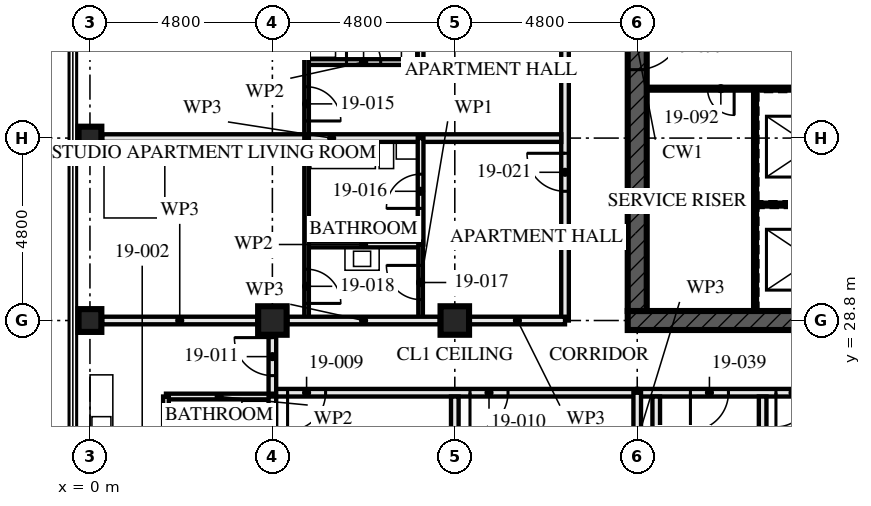
"""IFC4 building model, lengths in metres.
Left out: names, types, materials, properties, quantities, classifications, styles, units other than length and angle.
Written with IfcOpenShell. Run it as: python <this file> out.ifc"""

import sys

from ifc_helpers import new_model, si_unit, direction, frame, frame_2d, origin, origin_2d, place, context, subcontext, project, spatial, rectangle, hollow_rectangle, extrude, element, fill, save


model = new_model("IFC4")
c1 = context("Model", 3, precision=1e-05, world=origin(), true_north=direction((0.0, 1.0)))
c2 = subcontext(c1, "Body", "Model", "MODEL_VIEW")
j1 = project(units=[si_unit("LENGTHUNIT", "METRE"), si_unit("PLANEANGLEUNIT", "RADIAN")], contexts=[c1])
p1 = place(None, origin())
s1 = spatial("IfcSite", under=j1, at=p1, CompositionType="ELEMENT")
p2 = place(p1, origin())
s2 = spatial("IfcBuilding", under=s1, at=p2, CompositionType="ELEMENT")
p3 = place(p2, frame((0.0, 0.0, 72.5)))
s3 = spatial("IfcBuildingStorey", under=s2, at=p3, CompositionType="ELEMENT", Elevation=72.5)
for number, where, z_axis, x_axis in (
    (1, (0.0, 28.8, 0.0), (0.0, 0.0, 1.0), (0.0, 1.0, 0.0)),
    (2, (0.0, 33.6, 0.0), (0.0, 0.0, 1.0), (1.0, 0.0, 0.0)),
):
    element("IfcColumn", number, at=place(p3, frame(where, z_axis=z_axis, x_axis=x_axis)), inside=s3, PredefinedType="COLUMN", context=c2, shape_type="SweptSolid", body=[
        extrude(hollow_rectangle(XDim=0.6, YDim=0.6, WallThickness=0.08, at=origin_2d()), origin(), (0.0, 0.0, 1.0), 3.5),
    ])
for number, where, z_axis, x_axis in (
    (3, (4.8, 28.8, 0.0), (0.0, 0.0, 1.0), (0.0, 1.0, 0.0)),
    (4, (9.6, 28.8, 0.0), (0.0, 0.0, 1.0), (0.0, 1.0, 0.0)),
):
    element("IfcColumn", number, at=place(p3, frame(where, z_axis=z_axis, x_axis=x_axis)), inside=s3, PredefinedType="COLUMN", context=c2, shape_type="SweptSolid", body=[
        extrude(hollow_rectangle(XDim=0.75, YDim=0.75, WallThickness=0.08, at=origin_2d()), origin(), (0.0, 0.0, 1.0), 3.5),
    ])
p4 = place(p3, frame((14.15, 28.8, -0.17), z_axis=(0.0, 0.0, 1.0), x_axis=(1.0, 0.0, 0.0)))
e5 = element("IfcWall", 5, at=p4, inside=s3, PredefinedType="SHEAR", context=c2, shape_type="SweptSolid", body=[
    extrude(rectangle(XDim=14.9, YDim=0.5, at=frame_2d((7.45, 0.0))), origin(), (0.0, 0.0, 1.0), 3.5),
])
p5 = place(p4, frame((6.85, 0.0, 0.17)))
e6 = element("IfcOpeningElement", 6, at=p5, cuts=e5, PredefinedType="OPENING", context=c2, shape_type="SweptSolid", body=[
    extrude(rectangle(XDim=1.2, YDim=2.1, at=frame_2d((0.6, 1.05))), frame((0.0, 0.26, 0.0), z_axis=(0.0, -1.0, 0.0), x_axis=(1.0, 0.0, 0.0)), (0.0, 0.0, 1.0), 0.521),
])
p6 = place(p3, frame((14.4, 42.95, -0.17), z_axis=(0.0, 0.0, 1.0), x_axis=(0.0, -1.0, 0.0)))
e7 = element("IfcWall", 7, at=p6, inside=s3, PredefinedType="SHEAR", context=c2, shape_type="SweptSolid", body=[
    extrude(rectangle(XDim=13.9, YDim=0.5, at=frame_2d((6.95, 0.0))), origin(), (0.0, 0.0, 1.0), 3.5),
])
p7 = place(p6, frame((6.35, 0.0, 0.17)))
e8 = element("IfcOpeningElement", 8, at=p7, cuts=e7, PredefinedType="OPENING", context=c2, shape_type="SweptSolid", body=[
    extrude(rectangle(XDim=1.2, YDim=2.1, at=frame_2d((0.6, 1.05))), frame((0.0, 0.26, 0.0), z_axis=(0.0, -1.0, 0.0), x_axis=(1.0, 0.0, 0.0)), (0.0, 0.0, 1.0), 0.521),
])
p8 = place(p3, frame((2.0, 23.8, 0.0), z_axis=(0.0, 0.0, 1.0), x_axis=(0.0, 1.0, 0.0)))
e9 = element("IfcWall", 9, at=p8, inside=s3, PredefinedType="PARTITIONING", context=c2, shape_type="SweptSolid", body=[
    extrude(rectangle(XDim=3.0, YDim=0.15, at=frame_2d((1.5, 0.0))), origin(), (0.0, 0.0, 1.0), 2.55),
])
p9 = place(p8, frame((1.05, 0.0, 0.0)))
e10 = element("IfcOpeningElement", 10, at=p9, cuts=e9, PredefinedType="OPENING", context=c2, shape_type="SweptSolid", body=[
    extrude(rectangle(XDim=0.9, YDim=2.1, at=frame_2d((0.45, 1.05))), frame((0.0, 0.085, 0.0), z_axis=(0.0, -1.0, 0.0), x_axis=(1.0, 0.0, 0.0)), (0.0, 0.0, 1.0), 0.171),
])
p10 = place(p3, frame((2.0, 26.8, 0.0), z_axis=(0.0, 0.0, 1.0), x_axis=(1.0, 0.0, 0.0)))
e11 = element("IfcWall", 11, at=p10, inside=s3, PredefinedType="PARTITIONING", context=c2, shape_type="SweptSolid", body=[
    extrude(rectangle(XDim=2.8, YDim=0.15, at=frame_2d((1.4, 0.0))), origin(), (0.0, 0.0, 1.0), 3.33),
])
p11 = place(p3, frame((4.8, 19.52, 0.0), z_axis=(0.0, 0.0, 1.0), x_axis=(0.0, 1.0, 0.0)))
e12 = element("IfcWall", 12, at=p11, inside=s3, PredefinedType="PARTITIONING", context=c2, shape_type="SweptSolid", body=[
    extrude(rectangle(XDim=7.28, YDim=0.2, at=frame_2d((3.64, 0.0))), origin(), (0.0, 0.0, 1.0), 2.55),
])
p12 = place(p3, frame((9.6, 14.72, 0.0), z_axis=(0.0, 0.0, 1.0), x_axis=(0.0, 1.0, 0.0)))
e13 = element("IfcWall", 13, at=p12, inside=s3, PredefinedType="PARTITIONING", context=c2, shape_type="SweptSolid", body=[
    extrude(rectangle(XDim=12.08, YDim=0.2, at=frame_2d((6.04, 0.0))), origin(), (0.0, 0.0, 1.0), 2.55),
])
p13 = place(p3, frame((4.8, 26.9, 0.0), z_axis=(0.0, 0.0, 1.0), x_axis=(1.0, 0.0, 0.0)))
e14 = element("IfcWall", 14, at=p13, inside=s3, PredefinedType="PARTITIONING", context=c2, shape_type="SweptSolid", body=[
    extrude(rectangle(XDim=9.6, YDim=0.2, at=frame_2d((4.8, 0.0))), origin(), (0.0, 0.0, 1.0), 3.33),
])
p14 = place(p13, frame((0.4, 0.0, 0.0)))
e15 = element("IfcOpeningElement", 15, at=p14, cuts=e14, PredefinedType="OPENING", context=c2, shape_type="SweptSolid", body=[
    extrude(rectangle(XDim=1.0, YDim=2.1, at=frame_2d((0.5, 1.05))), frame((0.0, 0.111, 0.0), z_axis=(0.0, -1.0, 0.0), x_axis=(1.0, 0.0, 0.0)), (0.0, 0.0, 1.0), 0.221),
])
p15 = place(p13, frame((5.2, 0.0, 0.0)))
e16 = element("IfcOpeningElement", 16, at=p15, cuts=e14, PredefinedType="OPENING", context=c2, shape_type="SweptSolid", body=[
    extrude(rectangle(XDim=1.0, YDim=2.1, at=frame_2d((0.5, 1.05))), frame((0.0, 0.111, 0.0), z_axis=(0.0, -1.0, 0.0), x_axis=(1.0, 0.0, 0.0)), (0.0, 0.0, 1.0), 0.221),
])
p16 = place(p3, frame((4.8, 26.8, 0.0), z_axis=(0.0, 0.0, 1.0), x_axis=(0.0, 1.0, 0.0)))
e17 = element("IfcWall", 17, at=p16, inside=s3, PredefinedType="PARTITIONING", context=c2, shape_type="SweptSolid", body=[
    extrude(rectangle(XDim=1.605, YDim=0.2, at=frame_2d((0.802, 0.0))), origin(), (0.0, 0.0, 1.0), 3.33),
])
p17 = place(p16, frame((0.55, 0.0, 0.0)))
e18 = element("IfcOpeningElement", 18, at=p17, cuts=e17, PredefinedType="OPENING", context=c2, shape_type="SweptSolid", body=[
    extrude(rectangle(XDim=1.0, YDim=2.1, at=frame_2d((0.5, 1.05))), frame((0.0, 0.111, 0.0), z_axis=(0.0, -1.0, 0.0), x_axis=(1.0, 0.0, 0.0)), (0.0, 0.0, 1.0), 0.221),
])
p18 = place(p3, frame((5.7, 35.6, 0.0), z_axis=(0.0, 0.0, 1.0), x_axis=(1.0, 0.0, 0.0)))
e19 = element("IfcWall", 19, at=p18, inside=s3, PredefinedType="PARTITIONING", context=c2, shape_type="SweptSolid", body=[
    extrude(rectangle(XDim=3.0, YDim=0.15, at=frame_2d((1.5, 0.0))), origin(), (0.0, 0.0, 1.0), 3.33),
])
p19 = place(p18, frame((1.05, 0.0, 0.0)))
e20 = element("IfcOpeningElement", 20, at=p19, cuts=e19, PredefinedType="OPENING", context=c2, shape_type="SweptSolid", body=[
    extrude(rectangle(XDim=0.9, YDim=2.1, at=frame_2d((0.45, 1.05))), frame((0.0, 0.085, 0.0), z_axis=(0.0, -1.0, 0.0), x_axis=(1.0, 0.0, 0.0)), (0.0, 0.0, 1.0), 0.171),
])
p20 = place(p3, frame((8.7, 38.4, 0.0), z_axis=(0.0, 0.0, 1.0), x_axis=(0.0, -1.0, 0.0)))
e21 = element("IfcWall", 21, at=p20, inside=s3, PredefinedType="PARTITIONING", context=c2, shape_type="SweptSolid", body=[
    extrude(rectangle(XDim=2.8, YDim=0.15, at=frame_2d((1.4, 0.0))), origin(), (0.0, 0.0, 1.0), 3.33),
])
p21 = place(p3, frame((5.7, 38.4, 0.0), z_axis=(0.0, 0.0, 1.0), x_axis=(0.0, -1.0, 0.0)))
e22 = element("IfcWall", 22, at=p21, inside=s3, PredefinedType="PARTITIONING", context=c2, shape_type="SweptSolid", body=[
    extrude(rectangle(XDim=4.8, YDim=0.12, at=frame_2d((2.4, 0.0))), origin(), (0.0, 0.0, 1.0), 3.33),
])
p22 = place(p21, frame((3.45, 0.0, 0.0)))
e23 = element("IfcOpeningElement", 23, at=p22, cuts=e22, PredefinedType="OPENING", context=c2, shape_type="SweptSolid", body=[
    extrude(rectangle(XDim=0.9, YDim=2.1, at=frame_2d((0.45, 1.05))), frame((0.0, 0.071, 0.0), z_axis=(0.0, -1.0, 0.0), x_axis=(1.0, 0.0, 0.0)), (0.0, 0.0, 1.0), 0.141),
])
p23 = place(p3, frame((0.32, 33.6, 0.0), z_axis=(0.0, 0.0, 1.0), x_axis=(1.0, 0.0, 0.0)))
e24 = element("IfcWall", 24, at=p23, inside=s3, PredefinedType="PARTITIONING", context=c2, shape_type="SweptSolid", body=[
    extrude(rectangle(XDim=12.08, YDim=0.2, at=frame_2d((6.04, 0.0))), origin(), (0.0, 0.0, 1.0), 2.55),
])
p24 = place(p3, frame((5.7, 30.8, 0.0), z_axis=(0.0, 0.0, 1.0), x_axis=(1.0, 0.0, 0.0)))
e25 = element("IfcWall", 25, at=p24, inside=s3, PredefinedType="PARTITIONING", context=c2, shape_type="SweptSolid", body=[
    extrude(rectangle(XDim=3.0, YDim=0.15, at=frame_2d((1.5, 0.0))), origin(), (0.0, 0.0, 1.0), 3.33),
])
p25 = place(p3, frame((8.7, 33.6, 0.0), z_axis=(0.0, 0.0, 1.0), x_axis=(0.0, -1.0, 0.0)))
e26 = element("IfcWall", 26, at=p25, inside=s3, PredefinedType="PARTITIONING", context=c2, shape_type="SweptSolid", body=[
    extrude(rectangle(XDim=2.8, YDim=0.15, at=frame_2d((1.4, 0.0))), origin(), (0.0, 0.0, 1.0), 3.33),
])
p26 = place(p25, frame((0.95, 0.0, 0.0)))
e27 = element("IfcOpeningElement", 27, at=p26, cuts=e26, PredefinedType="OPENING", context=c2, shape_type="SweptSolid", body=[
    extrude(rectangle(XDim=0.9, YDim=2.1, at=frame_2d((0.45, 1.05))), frame((0.0, 0.085, 0.0), z_axis=(0.0, -1.0, 0.0), x_axis=(1.0, 0.0, 0.0)), (0.0, 0.0, 1.0), 0.171),
])
p27 = place(p3, frame((8.7, 30.8, 0.0), z_axis=(0.0, 0.0, 1.0), x_axis=(0.0, -1.0, 0.0)))
e28 = element("IfcWall", 28, at=p27, inside=s3, PredefinedType="PARTITIONING", context=c2, shape_type="SweptSolid", body=[
    extrude(rectangle(XDim=2.0, YDim=0.12, at=frame_2d((1.0, 0.0))), origin(), (0.0, 0.0, 1.0), 3.33),
])
p28 = place(p27, frame((0.55, 0.0, 0.0)))
e29 = element("IfcOpeningElement", 29, at=p28, cuts=e28, PredefinedType="OPENING", context=c2, shape_type="SweptSolid", body=[
    extrude(rectangle(XDim=0.9, YDim=2.1, at=frame_2d((0.45, 1.05))), frame((0.0, 0.071, 0.0), z_axis=(0.0, -1.0, 0.0), x_axis=(1.0, 0.0, 0.0)), (0.0, 0.0, 1.0), 0.141),
])
p29 = place(p3, frame((5.7, 33.6, 0.0), z_axis=(0.0, 0.0, 1.0), x_axis=(0.0, -1.0, 0.0)))
e30 = element("IfcWall", 30, at=p29, inside=s3, PredefinedType="PARTITIONING", context=c2, shape_type="SweptSolid", body=[
    extrude(rectangle(XDim=4.8, YDim=0.12, at=frame_2d((2.4, 0.0))), origin(), (0.0, 0.0, 1.0), 3.33),
])
p30 = place(p29, frame((3.45, 0.0, 0.0)))
e31 = element("IfcOpeningElement", 31, at=p30, cuts=e30, PredefinedType="OPENING", context=c2, shape_type="SweptSolid", body=[
    extrude(rectangle(XDim=0.9, YDim=2.1, at=frame_2d((0.45, 1.05))), frame((0.0, 0.071, 0.0), z_axis=(0.0, -1.0, 0.0), x_axis=(1.0, 0.0, 0.0)), (0.0, 0.0, 1.0), 0.141),
])
p31 = place(p3, frame((12.5, 43.2, 0.0), z_axis=(0.0, 0.0, 1.0), x_axis=(0.0, -1.0, 0.0)))
e32 = element("IfcWall", 32, at=p31, inside=s3, PredefinedType="PARTITIONING", context=c2, shape_type="SweptSolid", body=[
    extrude(rectangle(XDim=14.4, YDim=0.2, at=frame_2d((7.2, 0.0))), origin(), (0.0, 0.0, 1.0), 2.55),
])
p32 = place(p31, frame((1.4, 0.0, 0.0)))
e33 = element("IfcOpeningElement", 33, at=p32, cuts=e32, PredefinedType="OPENING", context=c2, shape_type="SweptSolid", body=[
    extrude(rectangle(XDim=1.0, YDim=2.1, at=frame_2d((0.5, 1.05))), frame((0.0, 0.111, 0.0), z_axis=(0.0, -1.0, 0.0), x_axis=(1.0, 0.0, 0.0)), (0.0, 0.0, 1.0), 0.221),
])
p33 = place(p31, frame((5.2, 0.0, 0.0)))
e34 = element("IfcOpeningElement", 34, at=p33, cuts=e32, PredefinedType="OPENING", context=c2, shape_type="SweptSolid", body=[
    extrude(rectangle(XDim=1.0, YDim=2.1, at=frame_2d((0.5, 1.05))), frame((0.0, 0.111, 0.0), z_axis=(0.0, -1.0, 0.0), x_axis=(1.0, 0.0, 0.0)), (0.0, 0.0, 1.0), 0.221),
])
p34 = place(p31, frame((10.0, 0.0, 0.0)))
e35 = element("IfcOpeningElement", 35, at=p34, cuts=e32, PredefinedType="OPENING", context=c2, shape_type="SweptSolid", body=[
    extrude(rectangle(XDim=1.0, YDim=2.1, at=frame_2d((0.5, 1.05))), frame((0.0, 0.111, 0.0), z_axis=(0.0, -1.0, 0.0), x_axis=(1.0, 0.0, 0.0)), (0.0, 0.0, 1.0), 0.221),
])
for number, where, z_axis, x_axis in (
    (36, (14.9, 22.1, 0.0), (0.0, 0.0, 1.0), (0.0, 1.0, 0.0)),
    (37, (17.7, 22.1, 0.0), (0.0, 0.0, 1.0), (0.0, 1.0, 0.0)),
):
    element("IfcWall", number, at=place(p3, frame(where, z_axis=z_axis, x_axis=x_axis)), inside=s3, PredefinedType="SOLIDWALL", context=c2, shape_type="SweptSolid", body=[
        extrude(rectangle(XDim=4.7, YDim=0.2, at=frame_2d((2.35, 0.0))), origin(), (0.0, 0.0, 1.0), 2.99),
    ])
p35 = place(p3, frame((14.4, 26.9, 0.0), z_axis=(0.0, 0.0, 1.0), x_axis=(1.0, 0.0, 0.0)))
e38 = element("IfcWall", 38, at=p35, inside=s3, PredefinedType="PARTITIONING", context=c2, shape_type="SweptSolid", body=[
    extrude(rectangle(XDim=14.4, YDim=0.2, at=frame_2d((7.2, 0.0))), origin(), (0.0, 0.0, 1.0), 2.55),
])
p36 = place(p35, frame((1.4, 0.0, 0.0)))
e39 = element("IfcOpeningElement", 39, at=p36, cuts=e38, PredefinedType="OPENING", context=c2, shape_type="SweptSolid", body=[
    extrude(rectangle(XDim=1.0, YDim=2.1, at=frame_2d((0.5, 1.05))), frame((0.0, 0.111, 0.0), z_axis=(0.0, -1.0, 0.0), x_axis=(1.0, 0.0, 0.0)), (0.0, 0.0, 1.0), 0.221),
])
p37 = place(p35, frame((3.65, 0.0, 0.0)))
e40 = element("IfcOpeningElement", 40, at=p37, cuts=e38, PredefinedType="OPENING", context=c2, shape_type="SweptSolid", body=[
    extrude(rectangle(XDim=0.9, YDim=2.1, at=frame_2d((0.45, 1.05))), frame((0.0, 0.111, 0.0), z_axis=(0.0, -1.0, 0.0), x_axis=(1.0, 0.0, 0.0)), (0.0, 0.0, 1.0), 0.221),
])
p38 = place(p35, frame((5.2, 0.0, 0.0)))
e41 = element("IfcOpeningElement", 41, at=p38, cuts=e38, PredefinedType="OPENING", context=c2, shape_type="SweptSolid", body=[
    extrude(rectangle(XDim=1.0, YDim=2.1, at=frame_2d((0.5, 1.05))), frame((0.0, 0.111, 0.0), z_axis=(0.0, -1.0, 0.0), x_axis=(1.0, 0.0, 0.0)), (0.0, 0.0, 1.0), 0.221),
])
p39 = place(p35, frame((10.0, 0.0, 0.0)))
e42 = element("IfcOpeningElement", 42, at=p39, cuts=e38, PredefinedType="OPENING", context=c2, shape_type="SweptSolid", body=[
    extrude(rectangle(XDim=1.0, YDim=2.1, at=frame_2d((0.5, 1.05))), frame((0.0, 0.111, 0.0), z_axis=(0.0, -1.0, 0.0), x_axis=(1.0, 0.0, 0.0)), (0.0, 0.0, 1.0), 0.221),
])
p40 = place(p3, frame((14.65, 34.9, 0.0), z_axis=(0.0, 0.0, 1.0), x_axis=(1.0, 0.0, 0.0)))
e43 = element("IfcWall", 43, at=p40, inside=s3, PredefinedType="SOLIDWALL", context=c2, shape_type="SweptSolid", body=[
    extrude(rectangle(XDim=5.9, YDim=0.1, at=frame_2d((2.95, 0.0))), origin(), (0.0, 0.0, 1.0), 3.33),
])
p41 = place(p40, frame((1.6, 0.0, 0.0)))
e44 = element("IfcOpeningElement", 44, at=p41, cuts=e43, PredefinedType="OPENING", context=c2, shape_type="SweptSolid", body=[
    extrude(rectangle(XDim=0.7, YDim=2.1, at=frame_2d((0.35, 1.05))), frame((0.0, 0.061, 0.0), z_axis=(0.0, -1.0, 0.0), x_axis=(1.0, 0.0, 0.0)), (0.0, 0.0, 1.0), 0.121),
])
p42 = place(p3, frame((17.5, 29.05, 0.0), z_axis=(0.0, 0.0, 1.0), x_axis=(0.0, 1.0, 0.0)))
e45 = element("IfcWall", 45, at=p42, inside=s3, PredefinedType="SOLIDWALL", context=c2, shape_type="SweptSolid", body=[
    extrude(rectangle(XDim=5.8, YDim=0.1, at=frame_2d((2.9, 0.0))), origin(), (0.0, 0.0, 1.0), 3.33),
])
p43 = place(p3, frame((17.55, 31.85, 0.0), z_axis=(0.0, 0.0, 1.0), x_axis=(1.0, 0.0, 0.0)))
e46 = element("IfcWall", 46, at=p43, inside=s3, PredefinedType="SOLIDWALL", context=c2, shape_type="SweptSolid", body=[
    extrude(rectangle(XDim=2.9, YDim=0.1, at=frame_2d((1.45, 0.0))), origin(), (0.0, 0.0, 1.0), 3.33),
])
p44 = place(p3, frame((12.5, 28.8, 0.0), z_axis=(0.0, 0.0, 1.0), x_axis=(-1.0, 0.0, 0.0)))
e47 = element("IfcWall", 47, at=p44, inside=s3, PredefinedType="PARTITIONING", context=c2, shape_type="SweptSolid", body=[
    extrude(rectangle(XDim=2.505, YDim=0.2, at=frame_2d((1.252, 0.0))), origin(), (0.0, 0.0, 1.0), 2.32),
])
p45 = place(p3, frame((9.205, 28.8, 0.0), z_axis=(0.0, 0.0, 1.0), x_axis=(-1.0, 0.0, 0.0)))
e48 = element("IfcWall", 48, at=p45, inside=s3, PredefinedType="PARTITIONING", context=c2, shape_type="SweptSolid", body=[
    extrude(rectangle(XDim=4.01, YDim=0.2, at=frame_2d((2.005, 0.0))), origin(), (0.0, 0.0, 1.0), 2.32),
])
p46 = place(p3, frame((4.405, 28.8, 0.0), z_axis=(0.0, 0.0, 1.0), x_axis=(-1.0, 0.0, 0.0)))
e49 = element("IfcWall", 49, at=p46, inside=s3, PredefinedType="PARTITIONING", context=c2, shape_type="SweptSolid", body=[
    extrude(rectangle(XDim=4.085, YDim=0.2, at=frame_2d((2.042, 0.0))), origin(), (0.0, 0.0, 1.0), 2.32),
])
p47 = place(p3, frame((14.4, 24.395, 0.0), z_axis=(0.0, 0.0, 1.0), x_axis=(0.0, 1.0, 0.0)))
e50 = element("IfcWall", 50, at=p47, inside=s3, PredefinedType="PARTITIONING", context=c2, shape_type="SweptSolid", body=[
    extrude(rectangle(XDim=2.505, YDim=0.2, at=frame_2d((1.252, 0.0))), origin(), (0.0, 0.0, 1.0), 2.32),
])
p48 = place(p14, frame((1.0, 0.0, 0.0), z_axis=(0.0, 0.0, 1.0), x_axis=(-1.0, 0.0, 0.0)))
e51 = element("IfcDoor", 51, at=p48, inside=s3, OperationType="SINGLE_SWING_LEFT", PredefinedType="DOOR", context=c2, shape_type="SweptSolid", body=[
    extrude(rectangle(XDim=1.0, YDim=2.1, at=frame_2d((0.5, 1.05))), frame((0.0, 0.027, 0.0), z_axis=(0.0, -1.0, 0.0), x_axis=(1.0, 0.0, 0.0)), (0.0, 0.0, 1.0), 0.054),
])
fill(e15, e51)
p49 = place(p15, frame((1.0, 0.0, 0.0), z_axis=(0.0, 0.0, 1.0), x_axis=(-1.0, 0.0, 0.0)))
e52 = element("IfcDoor", 52, at=p49, inside=s3, OperationType="SINGLE_SWING_LEFT", PredefinedType="DOOR", context=c2, shape_type="SweptSolid", body=[
    extrude(rectangle(XDim=1.0, YDim=2.1, at=frame_2d((0.5, 1.05))), frame((0.0, 0.027, 0.0), z_axis=(0.0, -1.0, 0.0), x_axis=(1.0, 0.0, 0.0)), (0.0, 0.0, 1.0), 0.054),
])
fill(e16, e52)
p50 = place(p17, origin())
e53 = element("IfcDoor", 53, at=p50, inside=s3, OperationType="SINGLE_SWING_LEFT", PredefinedType="DOOR", context=c2, shape_type="SweptSolid", body=[
    extrude(rectangle(XDim=1.0, YDim=2.1, at=frame_2d((0.5, 1.05))), frame((0.0, 0.027, 0.0), z_axis=(0.0, -1.0, 0.0), x_axis=(1.0, 0.0, 0.0)), (0.0, 0.0, 1.0), 0.054),
])
fill(e18, e53)
p51 = place(p19, origin())
e54 = element("IfcDoor", 54, at=p51, inside=s3, OperationType="SINGLE_SWING_RIGHT", PredefinedType="DOOR", context=c2, shape_type="SweptSolid", body=[
    extrude(rectangle(XDim=0.9, YDim=2.1, at=frame_2d((0.45, 1.05))), frame((0.0, 0.022, 0.0), z_axis=(0.0, -1.0, 0.0), x_axis=(1.0, 0.0, 0.0)), (0.0, 0.0, 1.0), 0.044),
])
fill(e20, e54)
p52 = place(p22, origin())
e55 = element("IfcDoor", 55, at=p52, inside=s3, OperationType="SINGLE_SWING_LEFT", PredefinedType="DOOR", context=c2, shape_type="SweptSolid", body=[
    extrude(rectangle(XDim=0.9, YDim=2.1, at=frame_2d((0.45, 1.05))), frame((0.0, 0.022, 0.0), z_axis=(0.0, -1.0, 0.0), x_axis=(1.0, 0.0, 0.0)), (0.0, 0.0, 1.0), 0.044),
])
fill(e23, e55)
p53 = place(p26, frame((0.9, 0.0, 0.0), z_axis=(0.0, 0.0, 1.0), x_axis=(-1.0, 0.0, 0.0)))
e56 = element("IfcDoor", 56, at=p53, inside=s3, OperationType="SINGLE_SWING_RIGHT", PredefinedType="DOOR", context=c2, shape_type="SweptSolid", body=[
    extrude(rectangle(XDim=0.9, YDim=2.1, at=frame_2d((0.45, 1.05))), frame((0.0, 0.022, 0.0), z_axis=(0.0, -1.0, 0.0), x_axis=(1.0, 0.0, 0.0)), (0.0, 0.0, 1.0), 0.044),
])
fill(e27, e56)
p54 = place(p28, frame((0.9, 0.0, 0.0), z_axis=(0.0, 0.0, 1.0), x_axis=(-1.0, 0.0, 0.0)))
e57 = element("IfcDoor", 57, at=p54, inside=s3, OperationType="SINGLE_SWING_LEFT", PredefinedType="DOOR", context=c2, shape_type="SweptSolid", body=[
    extrude(rectangle(XDim=0.9, YDim=2.1, at=frame_2d((0.45, 1.05))), frame((0.0, 0.022, 0.0), z_axis=(0.0, -1.0, 0.0), x_axis=(1.0, 0.0, 0.0)), (0.0, 0.0, 1.0), 0.044),
])
fill(e29, e57)
p55 = place(p30, origin())
e58 = element("IfcDoor", 58, at=p55, inside=s3, OperationType="SINGLE_SWING_LEFT", PredefinedType="DOOR", context=c2, shape_type="SweptSolid", body=[
    extrude(rectangle(XDim=0.9, YDim=2.1, at=frame_2d((0.45, 1.05))), frame((0.0, 0.022, 0.0), z_axis=(0.0, -1.0, 0.0), x_axis=(1.0, 0.0, 0.0)), (0.0, 0.0, 1.0), 0.044),
])
fill(e31, e58)
p56 = place(p34, frame((1.0, 0.0, 0.0), z_axis=(0.0, 0.0, 1.0), x_axis=(-1.0, 0.0, 0.0)))
e59 = element("IfcDoor", 59, at=p56, inside=s3, OperationType="SINGLE_SWING_LEFT", PredefinedType="DOOR", context=c2, shape_type="SweptSolid", body=[
    extrude(rectangle(XDim=1.0, YDim=2.1, at=frame_2d((0.5, 1.05))), frame((0.0, 0.027, 0.0), z_axis=(0.0, -1.0, 0.0), x_axis=(1.0, 0.0, 0.0)), (0.0, 0.0, 1.0), 0.054),
])
fill(e35, e59)
p57 = place(p36, frame((1.0, 0.0, 0.0), z_axis=(0.0, 0.0, 1.0), x_axis=(-1.0, 0.0, 0.0)))
e60 = element("IfcDoor", 60, at=p57, inside=s3, OperationType="SINGLE_SWING_LEFT", PredefinedType="DOOR", context=c2, shape_type="SweptSolid", body=[
    extrude(rectangle(XDim=1.0, YDim=2.1, at=frame_2d((0.5, 1.05))), frame((0.0, 0.032, 0.0), z_axis=(0.0, -1.0, 0.0), x_axis=(1.0, 0.0, 0.0)), (0.0, 0.0, 1.0), 0.064),
])
fill(e39, e60)
p58 = place(p37, frame((0.9, 0.0, 0.0), z_axis=(0.0, 0.0, 1.0), x_axis=(-1.0, 0.0, 0.0)))
e61 = element("IfcDoor", 61, at=p58, inside=s3, OperationType="SINGLE_SWING_LEFT", PredefinedType="DOOR", context=c2, shape_type="SweptSolid", body=[
    extrude(rectangle(XDim=0.9, YDim=2.1, at=frame_2d((0.45, 1.05))), frame((0.0, 0.027, 0.0), z_axis=(0.0, -1.0, 0.0), x_axis=(1.0, 0.0, 0.0)), (0.0, 0.0, 1.0), 0.054),
])
fill(e40, e61)
p59 = place(p41, frame((0.7, 0.0, 0.0), z_axis=(0.0, 0.0, 1.0), x_axis=(-1.0, 0.0, 0.0)))
e62 = element("IfcDoor", 62, at=p59, inside=s3, OperationType="SINGLE_SWING_RIGHT", PredefinedType="DOOR", context=c2, shape_type="SweptSolid", body=[
    extrude(rectangle(XDim=0.7, YDim=2.1, at=frame_2d((0.35, 1.05))), frame((0.0, 0.027, 0.0), z_axis=(0.0, -1.0, 0.0), x_axis=(1.0, 0.0, 0.0)), (0.0, 0.0, 1.0), 0.054),
])
fill(e44, e62)
p60 = place(p7, origin())
e63 = element("IfcDoor", 63, at=p60, inside=s3, OperationType="SINGLE_SWING_LEFT", PredefinedType="DOOR", context=c2, shape_type="SweptSolid", body=[
    extrude(rectangle(XDim=1.2, YDim=2.1, at=frame_2d((0.6, 1.05))), frame((0.0, 0.027, 0.0), z_axis=(0.0, -1.0, 0.0), x_axis=(1.0, 0.0, 0.0)), (0.0, 0.0, 1.0), 0.054),
])
fill(e8, e63)
save(model, sys.argv[1])
